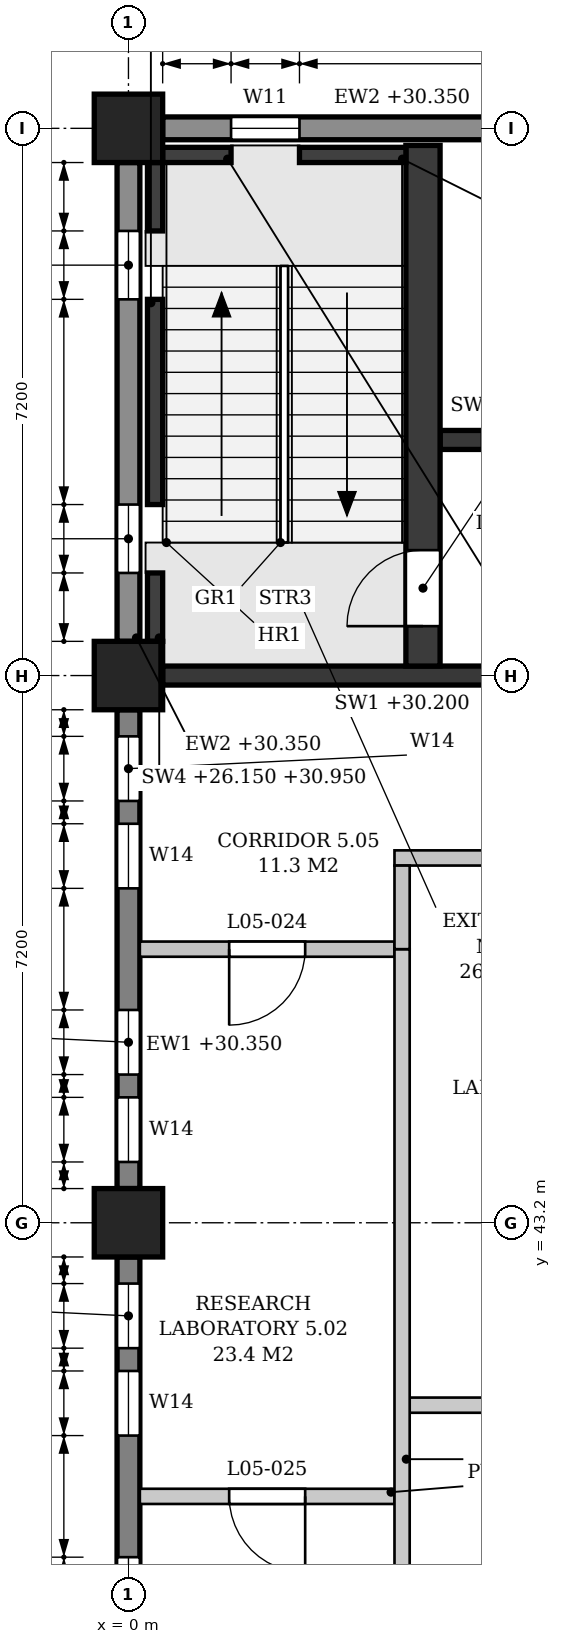
"""IFC4 building model, lengths in metres.
Left out: names, types, materials, properties, quantities, classifications, styles, units other than length and angle.
Written with IfcOpenShell. Run it as: python <this file> out.ifc"""

import sys

from ifc_helpers import new_model, si_unit, direction, frame, frame_2d, origin, origin_2d, place, context, subcontext, project, spatial, polyline, rectangle, outline, extrude, element, fill, save


model = new_model("IFC4")
c1 = context("Model", 3, precision=1e-05, world=origin(), true_north=direction((0.0, 1.0)))
c2 = subcontext(c1, "Body", "Model", "MODEL_VIEW")
j1 = project(units=[si_unit("LENGTHUNIT", "METRE"), si_unit("PLANEANGLEUNIT", "RADIAN")], contexts=[c1])
p1 = place(None, origin())
s1 = spatial("IfcSite", under=j1, at=p1, CompositionType="ELEMENT")
p2 = place(p1, origin())
s2 = spatial("IfcBuilding", under=s1, at=p2, CompositionType="ELEMENT")
p3 = place(p2, frame((0.0, 0.0, 26.4)))
s3 = spatial("IfcBuildingStorey", under=s2, at=p3, CompositionType="ELEMENT", Elevation=26.4)
for number, where, z_axis, x_axis in (
    (1, (0.0, 43.2, 0.0), (0.0, 0.0, 1.0), (1.0, 0.0, 0.0)),
    (2, (0.0, 50.4, 0.0), (0.0, 0.0, 1.0), (1.0, 0.0, 0.0)),
    (3, (0.0, 57.6, 0.0), (0.0, 0.0, 1.0), (1.0, 0.0, 0.0)),
):
    element("IfcColumn", number, at=place(p3, frame(where, z_axis=z_axis, x_axis=x_axis)), inside=s3, PredefinedType="COLUMN", context=c2, shape_type="SweptSolid", body=[
        extrude(rectangle(XDim=0.9, YDim=0.9, at=origin_2d()), origin(), (0.0, 0.0, 1.0), 4.8),
    ])
p4 = place(p3, frame((0.0, 36.45, 0.0), z_axis=(0.0, 0.0, 1.0), x_axis=(0.0, 1.0, 0.0)))
e4 = element("IfcWall", 4, at=p4, inside=s3, PredefinedType="STANDARD", context=c2, shape_type="SweptSolid", body=[
    extrude(rectangle(XDim=6.3, YDim=0.3, at=frame_2d((3.15, 0.0))), origin(), (0.0, 0.0, 1.0), 3.95),
])
p5 = place(p4, frame((0.35, 0.0, 0.9)))
e5 = element("IfcOpeningElement", 5, at=p5, cuts=e4, PredefinedType="OPENING", context=c2, shape_type="SweptSolid", body=[
    extrude(outline(polyline([(0.0, 0.0), (0.85, 0.0), (0.85, 2.05), (0.425, 2.5), (0.0, 2.05), (0.0, 0.0)])), frame((0.0, 0.16, 0.0), z_axis=(0.0, -1.0, 0.0), x_axis=(1.0, 0.0, 0.0)), (0.0, 0.0, 1.0), 0.32),
])
p6 = place(p4, frame((1.5, 0.0, 0.9)))
e6 = element("IfcOpeningElement", 6, at=p6, cuts=e4, PredefinedType="OPENING", context=c2, shape_type="SweptSolid", body=[
    extrude(outline(polyline([(0.0, 0.0), (0.85, 0.0), (0.85, 2.05), (0.425, 2.5), (0.0, 2.05), (0.0, 0.0)])), frame((0.0, 0.16, 0.0), z_axis=(0.0, -1.0, 0.0), x_axis=(1.0, 0.0, 0.0)), (0.0, 0.0, 1.0), 0.32),
])
p7 = place(p4, frame((3.95, 0.0, 0.9)))
e7 = element("IfcOpeningElement", 7, at=p7, cuts=e4, PredefinedType="OPENING", context=c2, shape_type="SweptSolid", body=[
    extrude(outline(polyline([(0.0, 0.0), (0.85, 0.0), (0.85, 2.05), (0.425, 2.5), (0.0, 2.05), (0.0, 0.0)])), frame((0.0, 0.16, 0.0), z_axis=(0.0, -1.0, 0.0), x_axis=(1.0, 0.0, 0.0)), (0.0, 0.0, 1.0), 0.32),
])
p8 = place(p4, frame((5.1, 0.0, 0.9)))
e8 = element("IfcOpeningElement", 8, at=p8, cuts=e4, PredefinedType="OPENING", context=c2, shape_type="SweptSolid", body=[
    extrude(outline(polyline([(0.0, 0.0), (0.85, 0.0), (0.85, 2.05), (0.425, 2.5), (0.0, 2.05), (0.0, 0.0)])), frame((0.0, 0.16, 0.0), z_axis=(0.0, -1.0, 0.0), x_axis=(1.0, 0.0, 0.0)), (0.0, 0.0, 1.0), 0.32),
])
p9 = place(p3, frame((0.0, 43.65, 0.0), z_axis=(0.0, 0.0, 1.0), x_axis=(0.0, 1.0, 0.0)))
e9 = element("IfcWall", 9, at=p9, inside=s3, PredefinedType="STANDARD", context=c2, shape_type="SweptSolid", body=[
    extrude(rectangle(XDim=6.3, YDim=0.3, at=frame_2d((3.15, 0.0))), origin(), (0.0, 0.0, 1.0), 3.95),
])
p10 = place(p9, frame((0.35, 0.0, 0.9)))
e10 = element("IfcOpeningElement", 10, at=p10, cuts=e9, PredefinedType="OPENING", context=c2, shape_type="SweptSolid", body=[
    extrude(outline(polyline([(0.0, 0.0), (0.85, 0.0), (0.85, 2.05), (0.425, 2.5), (0.0, 2.05), (0.0, 0.0)])), frame((0.0, 0.16, 0.0), z_axis=(0.0, -1.0, 0.0), x_axis=(1.0, 0.0, 0.0)), (0.0, 0.0, 1.0), 0.32),
])
p11 = place(p9, frame((1.5, 0.0, 0.9)))
e11 = element("IfcOpeningElement", 11, at=p11, cuts=e9, PredefinedType="OPENING", context=c2, shape_type="SweptSolid", body=[
    extrude(outline(polyline([(0.0, 0.0), (0.85, 0.0), (0.85, 2.05), (0.425, 2.5), (0.0, 2.05), (0.0, 0.0)])), frame((0.0, 0.16, 0.0), z_axis=(0.0, -1.0, 0.0), x_axis=(1.0, 0.0, 0.0)), (0.0, 0.0, 1.0), 0.32),
])
p12 = place(p9, frame((3.95, 0.0, 0.9)))
e12 = element("IfcOpeningElement", 12, at=p12, cuts=e9, PredefinedType="OPENING", context=c2, shape_type="SweptSolid", body=[
    extrude(outline(polyline([(0.0, 0.0), (0.85, 0.0), (0.85, 2.05), (0.425, 2.5), (0.0, 2.05), (0.0, 0.0)])), frame((0.0, 0.16, 0.0), z_axis=(0.0, -1.0, 0.0), x_axis=(1.0, 0.0, 0.0)), (0.0, 0.0, 1.0), 0.32),
])
p13 = place(p9, frame((5.1, 0.0, 0.9)))
e13 = element("IfcOpeningElement", 13, at=p13, cuts=e9, PredefinedType="OPENING", context=c2, shape_type="SweptSolid", body=[
    extrude(outline(polyline([(0.0, 0.0), (0.85, 0.0), (0.85, 2.05), (0.425, 2.5), (0.0, 2.05), (0.0, 0.0)])), frame((0.0, 0.16, 0.0), z_axis=(0.0, -1.0, 0.0), x_axis=(1.0, 0.0, 0.0)), (0.0, 0.0, 1.0), 0.32),
])
p14 = place(p3, frame((0.0, 50.85, 0.0), z_axis=(0.0, 0.0, 1.0), x_axis=(0.0, 1.0, 0.0)))
e14 = element("IfcWall", 14, at=p14, inside=s3, PredefinedType="STANDARD", context=c2, shape_type="SweptSolid", body=[
    extrude(rectangle(XDim=6.3, YDim=0.3, at=frame_2d((3.15, 0.0))), origin(), (0.0, 0.0, 1.0), 3.95),
])
p15 = place(p14, frame((0.9, 0.0, 0.9)))
e15 = element("IfcOpeningElement", 15, at=p15, cuts=e14, PredefinedType="OPENING", context=c2, shape_type="SweptSolid", body=[
    extrude(outline(polyline([(0.0, 0.0), (0.9, 0.0), (0.9, 2.05), (0.45, 2.5), (0.0, 2.05), (0.0, 0.0)])), frame((0.0, 0.16, 0.0), z_axis=(0.0, -1.0, 0.0), x_axis=(1.0, 0.0, 0.0)), (0.0, 0.0, 1.0), 0.32),
])
p16 = place(p14, frame((4.5, 0.0, 0.9)))
e16 = element("IfcOpeningElement", 16, at=p16, cuts=e14, PredefinedType="OPENING", context=c2, shape_type="SweptSolid", body=[
    extrude(outline(polyline([(0.0, 0.0), (0.9, 0.0), (0.9, 2.05), (0.45, 2.5), (0.0, 2.05), (0.0, 0.0)])), frame((0.0, 0.16, 0.0), z_axis=(0.0, -1.0, 0.0), x_axis=(1.0, 0.0, 0.0)), (0.0, 0.0, 1.0), 0.32),
])
p17 = place(p3, frame((6.75, 57.6, 0.0), z_axis=(0.0, 0.0, 1.0), x_axis=(-1.0, 0.0, 0.0)))
e17 = element("IfcWall", 17, at=p17, inside=s3, PredefinedType="STANDARD", context=c2, shape_type="SweptSolid", body=[
    extrude(rectangle(XDim=6.3, YDim=0.3, at=frame_2d((3.15, 0.0))), origin(), (0.0, 0.0, 1.0), 3.95),
])
p18 = place(p17, frame((4.5, 0.0, 0.9)))
e18 = element("IfcOpeningElement", 18, at=p18, cuts=e17, PredefinedType="OPENING", context=c2, shape_type="SweptSolid", body=[
    extrude(outline(polyline([(0.0, 0.0), (0.9, 0.0), (0.9, 2.05), (0.45, 2.5), (0.0, 2.05), (0.0, 0.0)])), frame((0.0, 0.16, 0.0), z_axis=(0.0, -1.0, 0.0), x_axis=(1.0, 0.0, 0.0)), (0.0, 0.0, 1.0), 0.32),
])
p19 = place(p3, frame((0.45, 50.4, 0.0), z_axis=(0.0, 0.0, 1.0), x_axis=(1.0, 0.0, 0.0)))
e19 = element("IfcWall", 19, at=p19, inside=s3, PredefinedType="SHEAR", context=c2, shape_type="SweptSolid", body=[
    extrude(rectangle(XDim=6.3, YDim=0.25, at=frame_2d((3.15, 0.0))), origin(), (0.0, 0.0, 1.0), 3.8),
])
p20 = place(p19, frame((4.8, 0.0, 0.0)))
e20 = element("IfcOpeningElement", 20, at=p20, cuts=e19, PredefinedType="OPENING", context=c2, shape_type="SweptSolid", body=[
    extrude(rectangle(XDim=1.1, YDim=2.1, at=frame_2d((0.55, 1.05))), frame((0.0, 0.135, 0.0), z_axis=(0.0, -1.0, 0.0), x_axis=(1.0, 0.0, 0.0)), (0.0, 0.0, 1.0), 0.27),
])
p21 = place(p3, frame((0.35, 50.85, -0.25), z_axis=(0.0, 0.0, 1.0), x_axis=(0.0, 1.0, 0.0)))
e21 = element("IfcWall", 21, at=p21, inside=s3, PredefinedType="SHEAR", context=c2, shape_type="SweptSolid", body=[
    extrude(rectangle(XDim=0.9, YDim=0.2, at=frame_2d((0.45, 0.0))), origin(), (0.0, 0.0, 1.0), 4.8),
])
p22 = place(p3, frame((0.35, 52.65, -0.25), z_axis=(0.0, 0.0, 1.0), x_axis=(0.0, 1.0, 0.0)))
e22 = element("IfcWall", 22, at=p22, inside=s3, PredefinedType="SHEAR", context=c2, shape_type="SweptSolid", body=[
    extrude(rectangle(XDim=2.7, YDim=0.2, at=frame_2d((1.35, 0.0))), origin(), (0.0, 0.0, 1.0), 4.8),
])
p23 = place(p3, frame((0.35, 56.25, -0.25), z_axis=(0.0, 0.0, 1.0), x_axis=(0.0, 1.0, 0.0)))
e23 = element("IfcWall", 23, at=p23, inside=s3, PredefinedType="SHEAR", context=c2, shape_type="SweptSolid", body=[
    extrude(rectangle(XDim=0.9, YDim=0.2, at=frame_2d((0.45, 0.0))), origin(), (0.0, 0.0, 1.0), 4.8),
])
p24 = place(p3, frame((0.45, 57.25, -0.25), z_axis=(0.0, 0.0, 1.0), x_axis=(1.0, 0.0, 0.0)))
e24 = element("IfcWall", 24, at=p24, inside=s3, PredefinedType="SHEAR", context=c2, shape_type="SweptSolid", body=[
    extrude(rectangle(XDim=0.9, YDim=0.2, at=frame_2d((0.45, 0.0))), origin(), (0.0, 0.0, 1.0), 4.8),
])
p25 = place(p3, frame((2.25, 57.25, -0.25), z_axis=(0.0, 0.0, 1.0), x_axis=(1.0, 0.0, 0.0)))
e25 = element("IfcWall", 25, at=p25, inside=s3, PredefinedType="SHEAR", context=c2, shape_type="SweptSolid", body=[
    extrude(rectangle(XDim=1.4, YDim=0.2, at=frame_2d((0.7, 0.0))), origin(), (0.0, 0.0, 1.0), 4.8),
])
p26 = place(p3, frame((3.875, 50.525, 0.0), z_axis=(0.0, 0.0, 1.0), x_axis=(0.0, 1.0, 0.0)))
e26 = element("IfcWall", 26, at=p26, inside=s3, PredefinedType="SHEAR", context=c2, shape_type="SweptSolid", body=[
    extrude(rectangle(XDim=6.85, YDim=0.45, at=frame_2d((3.425, 0.0))), origin(), (0.0, 0.0, 1.0), 4.55),
])
p27 = place(p26, frame((0.525, 0.0, 0.0)))
e27 = element("IfcOpeningElement", 27, at=p27, cuts=e26, PredefinedType="OPENING", context=c2, shape_type="SweptSolid", body=[
    extrude(rectangle(XDim=1.0, YDim=2.1, at=frame_2d((0.5, 1.05))), frame((0.0, 0.235, 0.0), z_axis=(0.0, -1.0, 0.0), x_axis=(1.0, 0.0, 0.0)), (0.0, 0.0, 1.0), 0.47),
])
p28 = place(p3, frame((4.1, 53.5, 0.0), z_axis=(0.0, 0.0, 1.0), x_axis=(1.0, 0.0, 0.0)))
e28 = element("IfcWall", 28, at=p28, inside=s3, PredefinedType="SHEAR", context=c2, shape_type="SweptSolid", body=[
    extrude(rectangle(XDim=2.975, YDim=0.25, at=frame_2d((1.487, 0.0))), origin(), (0.0, 0.0, 1.0), 4.55),
])
p29 = place(p28, frame((0.55, 0.0, 0.0)))
e29 = element("IfcOpeningElement", 29, at=p29, cuts=e28, PredefinedType="OPENING", context=c2, shape_type="SweptSolid", body=[
    extrude(rectangle(XDim=0.9, YDim=2.1, at=frame_2d((0.45, 1.05))), frame((0.0, 0.135, 0.0), z_axis=(0.0, -1.0, 0.0), x_axis=(1.0, 0.0, 0.0)), (0.0, 0.0, 1.0), 0.27),
])
p30 = place(p3, frame((0.15, 39.6, 0.0), z_axis=(0.0, 0.0, 1.0), x_axis=(1.0, 0.0, 0.0)))
e30 = element("IfcWall", 30, at=p30, inside=s3, PredefinedType="PARTITIONING", context=c2, shape_type="SweptSolid", body=[
    extrude(outline(polyline([(0.0, 0.0), (3.35, 0.0), (3.35, 4.55), (0.1, 4.55), (0.1, 3.95), (0.0, 3.95), (0.0, 0.0)])), frame((0.0, 0.1, 0.0), z_axis=(0.0, -1.0, 0.0), x_axis=(1.0, 0.0, 0.0)), (0.0, 0.0, 1.0), 0.2),
])
p31 = place(p30, frame((1.175, 0.0, 0.0)))
e31 = element("IfcOpeningElement", 31, at=p31, cuts=e30, PredefinedType="OPENING", context=c2, shape_type="SweptSolid", body=[
    extrude(rectangle(XDim=1.0, YDim=2.1, at=frame_2d((0.5, 1.05))), frame((0.0, 0.11, 0.0), z_axis=(0.0, -1.0, 0.0), x_axis=(1.0, 0.0, 0.0)), (0.0, 0.0, 1.0), 0.22),
])
p32 = place(p3, frame((3.7, 40.8, 0.0), z_axis=(0.0, 0.0, 1.0), x_axis=(1.0, 0.0, 0.0)))
e32 = element("IfcWall", 32, at=p32, inside=s3, PredefinedType="PARTITIONING", context=c2, shape_type="SweptSolid", body=[
    extrude(outline(polyline([(0.0, 0.0), (7.0, 0.0), (7.0, 4.55), (3.75, 4.55), (3.75, 3.8), (3.25, 3.8), (3.25, 4.55), (0.0, 4.55), (0.0, 0.0)])), frame((0.0, 0.1, 0.0), z_axis=(0.0, -1.0, 0.0), x_axis=(1.0, 0.0, 0.0)), (0.0, 0.0, 1.0), 0.2),
])
p33 = place(p32, frame((1.25, 0.0, 0.0)))
e33 = element("IfcOpeningElement", 33, at=p33, cuts=e32, PredefinedType="OPENING", context=c2, shape_type="SweptSolid", body=[
    extrude(rectangle(XDim=1.0, YDim=2.1, at=frame_2d((0.5, 1.05))), frame((0.0, 0.11, 0.0), z_axis=(0.0, -1.0, 0.0), x_axis=(1.0, 0.0, 0.0)), (0.0, 0.0, 1.0), 0.22),
])
p34 = place(p32, frame((4.75, 0.0, 0.0)))
e34 = element("IfcOpeningElement", 34, at=p34, cuts=e32, PredefinedType="OPENING", context=c2, shape_type="SweptSolid", body=[
    extrude(rectangle(XDim=1.0, YDim=2.1, at=frame_2d((0.5, 1.05))), frame((0.0, 0.11, 0.0), z_axis=(0.0, -1.0, 0.0), x_axis=(1.0, 0.0, 0.0)), (0.0, 0.0, 1.0), 0.22),
])
p35 = place(p3, frame((0.15, 46.8, 0.0), z_axis=(0.0, 0.0, 1.0), x_axis=(1.0, 0.0, 0.0)))
e35 = element("IfcWall", 35, at=p35, inside=s3, PredefinedType="PARTITIONING", context=c2, shape_type="SweptSolid", body=[
    extrude(outline(polyline([(0.0, 0.0), (3.35, 0.0), (3.35, 4.55), (0.1, 4.55), (0.1, 3.95), (0.0, 3.95), (0.0, 0.0)])), frame((0.0, 0.1, 0.0), z_axis=(0.0, -1.0, 0.0), x_axis=(1.0, 0.0, 0.0)), (0.0, 0.0, 1.0), 0.2),
])
p36 = place(p35, frame((1.175, 0.0, 0.0)))
e36 = element("IfcOpeningElement", 36, at=p36, cuts=e35, PredefinedType="OPENING", context=c2, shape_type="SweptSolid", body=[
    extrude(rectangle(XDim=1.0, YDim=2.1, at=frame_2d((0.5, 1.05))), frame((0.0, 0.11, 0.0), z_axis=(0.0, -1.0, 0.0), x_axis=(1.0, 0.0, 0.0)), (0.0, 0.0, 1.0), 0.22),
])
p37 = place(p3, frame((3.5, 48.0, 0.0), z_axis=(0.0, 0.0, 1.0), x_axis=(1.0, 0.0, 0.0)))
e37 = element("IfcWall", 37, at=p37, inside=s3, PredefinedType="PARTITIONING", context=c2, shape_type="SweptSolid", body=[
    extrude(outline(polyline([(0.0, 0.0), (14.6, 0.0), (14.6, 4.55), (11.15, 4.55), (11.15, 3.8), (10.65, 3.8), (10.65, 4.55), (3.95, 4.55), (3.95, 3.8), (3.45, 3.8), (3.45, 4.55), (0.0, 4.55), (0.0, 0.0)])), frame((0.0, 0.1, 0.0), z_axis=(0.0, -1.0, 0.0), x_axis=(1.0, 0.0, 0.0)), (0.0, 0.0, 1.0), 0.2),
])
p38 = place(p37, frame((3.2, 0.0, 0.0)))
e38 = element("IfcOpeningElement", 38, at=p38, cuts=e37, PredefinedType="OPENING", context=c2, shape_type="SweptSolid", body=[
    extrude(rectangle(XDim=1.0, YDim=2.1, at=frame_2d((0.5, 1.05))), frame((0.0, 0.11, 0.0), z_axis=(0.0, -1.0, 0.0), x_axis=(1.0, 0.0, 0.0)), (0.0, 0.0, 1.0), 0.22),
])
p39 = place(p37, frame((8.6, 0.0, 0.0)))
e39 = element("IfcOpeningElement", 39, at=p39, cuts=e37, PredefinedType="OPENING", context=c2, shape_type="SweptSolid", body=[
    extrude(rectangle(XDim=1.0, YDim=2.1, at=frame_2d((0.5, 1.05))), frame((0.0, 0.11, 0.0), z_axis=(0.0, -1.0, 0.0), x_axis=(1.0, 0.0, 0.0)), (0.0, 0.0, 1.0), 0.22),
])
p40 = place(p3, frame((3.6, 36.15, 0.0), z_axis=(0.0, 0.0, 1.0), x_axis=(0.0, 1.0, 0.0)))
e40 = element("IfcWall", 40, at=p40, inside=s3, PredefinedType="PARTITIONING", context=c2, shape_type="SweptSolid", body=[
    extrude(outline(polyline([(0.0, 0.0), (10.65, 0.0), (10.65, 4.55), (7.3, 4.55), (7.3, 3.8), (6.8, 3.8), (6.8, 4.55), (0.1, 4.55), (0.1, 3.95), (0.0, 3.95), (0.0, 0.0)])), frame((0.0, 0.1, 0.0), z_axis=(0.0, -1.0, 0.0), x_axis=(1.0, 0.0, 0.0)), (0.0, 0.0, 1.0), 0.2),
])
p41 = place(p3, frame((3.6, 46.8, 0.0), z_axis=(0.0, 0.0, 1.0), x_axis=(0.0, 1.0, 0.0)))
e41 = element("IfcWall", 41, at=p41, inside=s3, PredefinedType="PARTITIONING", context=c2, shape_type="SweptSolid", body=[
    extrude(rectangle(XDim=1.1, YDim=0.2, at=frame_2d((0.55, 0.0))), origin(), (0.0, 0.0, 1.0), 4.55),
])
p42 = place(p18, origin())
e42 = element("IfcWindow", 42, at=p42, inside=s3, PartitioningType="SINGLE_PANEL", PredefinedType="WINDOW", context=c2, shape_type="SweptSolid", body=[
    extrude(outline(polyline([(0.0, 0.0), (0.9, 0.0), (0.9, 2.05), (0.45, 2.5), (0.0, 2.05), (0.0, 0.0)])), frame((0.0, 0.03, 0.0), z_axis=(0.0, -1.0, 0.0), x_axis=(1.0, 0.0, 0.0)), (0.0, 0.0, 1.0), 0.06),
])
fill(e18, e42)
p43 = place(p6, origin())
e43 = element("IfcWindow", 43, at=p43, inside=s3, PartitioningType="SINGLE_PANEL", PredefinedType="WINDOW", context=c2, shape_type="SweptSolid", body=[
    extrude(outline(polyline([(0.0, 0.0), (0.85, 0.0), (0.85, 2.05), (0.425, 2.5), (0.0, 2.05), (0.0, 0.0)])), frame((0.0, 0.03, 0.0), z_axis=(0.0, -1.0, 0.0), x_axis=(1.0, 0.0, 0.0)), (0.0, 0.0, 1.0), 0.06),
])
fill(e6, e43)
p44 = place(p7, origin())
e44 = element("IfcWindow", 44, at=p44, inside=s3, PartitioningType="SINGLE_PANEL", PredefinedType="WINDOW", context=c2, shape_type="SweptSolid", body=[
    extrude(outline(polyline([(0.0, 0.0), (0.85, 0.0), (0.85, 2.05), (0.425, 2.5), (0.0, 2.05), (0.0, 0.0)])), frame((0.0, 0.03, 0.0), z_axis=(0.0, -1.0, 0.0), x_axis=(1.0, 0.0, 0.0)), (0.0, 0.0, 1.0), 0.06),
])
fill(e7, e44)
p45 = place(p8, origin())
e45 = element("IfcWindow", 45, at=p45, inside=s3, PartitioningType="SINGLE_PANEL", PredefinedType="WINDOW", context=c2, shape_type="SweptSolid", body=[
    extrude(outline(polyline([(0.0, 0.0), (0.85, 0.0), (0.85, 2.05), (0.425, 2.5), (0.0, 2.05), (0.0, 0.0)])), frame((0.0, 0.03, 0.0), z_axis=(0.0, -1.0, 0.0), x_axis=(1.0, 0.0, 0.0)), (0.0, 0.0, 1.0), 0.06),
])
fill(e8, e45)
p46 = place(p10, origin())
e46 = element("IfcWindow", 46, at=p46, inside=s3, PartitioningType="SINGLE_PANEL", PredefinedType="WINDOW", context=c2, shape_type="SweptSolid", body=[
    extrude(outline(polyline([(0.0, 0.0), (0.85, 0.0), (0.85, 2.05), (0.425, 2.5), (0.0, 2.05), (0.0, 0.0)])), frame((0.0, 0.03, 0.0), z_axis=(0.0, -1.0, 0.0), x_axis=(1.0, 0.0, 0.0)), (0.0, 0.0, 1.0), 0.06),
])
fill(e10, e46)
p47 = place(p11, origin())
e47 = element("IfcWindow", 47, at=p47, inside=s3, PartitioningType="SINGLE_PANEL", PredefinedType="WINDOW", context=c2, shape_type="SweptSolid", body=[
    extrude(outline(polyline([(0.0, 0.0), (0.85, 0.0), (0.85, 2.05), (0.425, 2.5), (0.0, 2.05), (0.0, 0.0)])), frame((0.0, 0.03, 0.0), z_axis=(0.0, -1.0, 0.0), x_axis=(1.0, 0.0, 0.0)), (0.0, 0.0, 1.0), 0.06),
])
fill(e11, e47)
p48 = place(p12, origin())
e48 = element("IfcWindow", 48, at=p48, inside=s3, PartitioningType="SINGLE_PANEL", PredefinedType="WINDOW", context=c2, shape_type="SweptSolid", body=[
    extrude(outline(polyline([(0.0, 0.0), (0.85, 0.0), (0.85, 2.05), (0.425, 2.5), (0.0, 2.05), (0.0, 0.0)])), frame((0.0, 0.03, 0.0), z_axis=(0.0, -1.0, 0.0), x_axis=(1.0, 0.0, 0.0)), (0.0, 0.0, 1.0), 0.06),
])
fill(e12, e48)
p49 = place(p13, origin())
e49 = element("IfcWindow", 49, at=p49, inside=s3, PartitioningType="SINGLE_PANEL", PredefinedType="WINDOW", context=c2, shape_type="SweptSolid", body=[
    extrude(outline(polyline([(0.0, 0.0), (0.85, 0.0), (0.85, 2.05), (0.425, 2.5), (0.0, 2.05), (0.0, 0.0)])), frame((0.0, 0.03, 0.0), z_axis=(0.0, -1.0, 0.0), x_axis=(1.0, 0.0, 0.0)), (0.0, 0.0, 1.0), 0.06),
])
fill(e13, e49)
p50 = place(p15, origin())
e50 = element("IfcWindow", 50, at=p50, inside=s3, PartitioningType="SINGLE_PANEL", PredefinedType="WINDOW", context=c2, shape_type="SweptSolid", body=[
    extrude(outline(polyline([(0.0, 0.0), (0.9, 0.0), (0.9, 2.05), (0.45, 2.5), (0.0, 2.05), (0.0, 0.0)])), frame((0.0, 0.03, 0.0), z_axis=(0.0, -1.0, 0.0), x_axis=(1.0, 0.0, 0.0)), (0.0, 0.0, 1.0), 0.06),
])
fill(e15, e50)
p51 = place(p16, origin())
e51 = element("IfcWindow", 51, at=p51, inside=s3, PartitioningType="SINGLE_PANEL", PredefinedType="WINDOW", context=c2, shape_type="SweptSolid", body=[
    extrude(outline(polyline([(0.0, 0.0), (0.9, 0.0), (0.9, 2.05), (0.45, 2.5), (0.0, 2.05), (0.0, 0.0)])), frame((0.0, 0.03, 0.0), z_axis=(0.0, -1.0, 0.0), x_axis=(1.0, 0.0, 0.0)), (0.0, 0.0, 1.0), 0.06),
])
fill(e16, e51)
p52 = place(p27, origin())
e52 = element("IfcDoor", 52, at=p52, inside=s3, OperationType="SINGLE_SWING_LEFT", PredefinedType="DOOR", context=c2, shape_type="SweptSolid", body=[
    extrude(rectangle(XDim=1.0, YDim=2.1, at=frame_2d((0.5, 1.05))), frame((0.0, 0.025, 0.0), z_axis=(0.0, -1.0, 0.0), x_axis=(1.0, 0.0, 0.0)), (0.0, 0.0, 1.0), 0.05),
])
fill(e27, e52)
p53 = place(p36, frame((1.0, 0.0, 0.0), z_axis=(0.0, 0.0, 1.0), x_axis=(-1.0, 0.0, 0.0)))
e53 = element("IfcDoor", 53, at=p53, inside=s3, OperationType="SINGLE_SWING_RIGHT", PredefinedType="DOOR", context=c2, shape_type="SweptSolid", body=[
    extrude(rectangle(XDim=1.0, YDim=2.1, at=frame_2d((0.5, 1.05))), frame((0.0, 0.025, 0.0), z_axis=(0.0, -1.0, 0.0), x_axis=(1.0, 0.0, 0.0)), (0.0, 0.0, 1.0), 0.05),
])
fill(e36, e53)
p54 = place(p31, frame((1.0, 0.0, 0.0), z_axis=(0.0, 0.0, 1.0), x_axis=(-1.0, 0.0, 0.0)))
e54 = element("IfcDoor", 54, at=p54, inside=s3, OperationType="SINGLE_SWING_LEFT", PredefinedType="DOOR", context=c2, shape_type="SweptSolid", body=[
    extrude(rectangle(XDim=1.0, YDim=2.1, at=frame_2d((0.5, 1.05))), frame((0.0, 0.025, 0.0), z_axis=(0.0, -1.0, 0.0), x_axis=(1.0, 0.0, 0.0)), (0.0, 0.0, 1.0), 0.05),
])
fill(e31, e54)
save(model, sys.argv[1])
